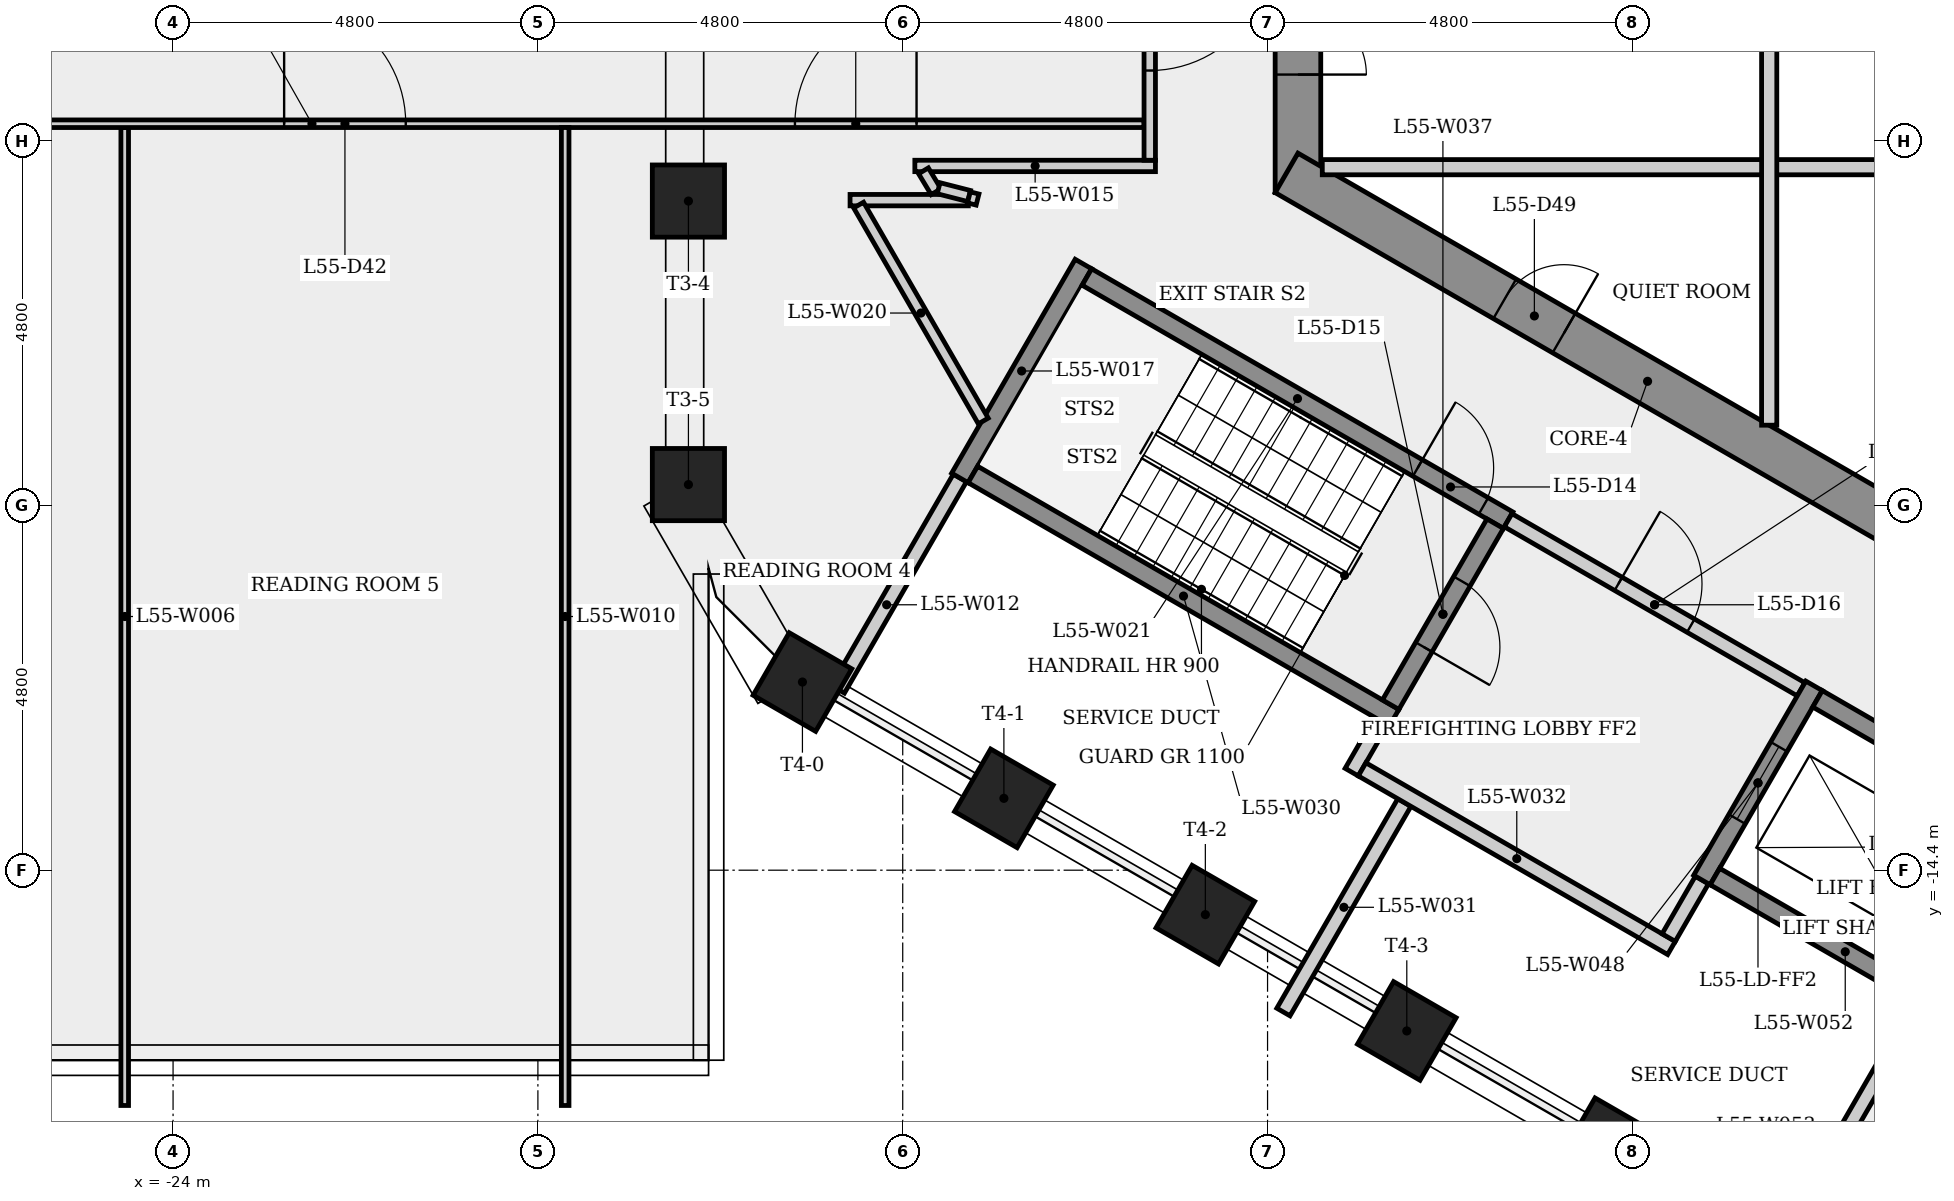
"""IFC4 building model, lengths in metres.
Left out: names, types, materials, properties, quantities, classifications, styles, units other than length and angle.
Written with IfcOpenShell. Run it as: python <this file> out.ifc"""

import sys

from ifc_helpers import new_model, si_unit, direction, frame, frame_2d, origin, origin_2d, place, context, subcontext, project, spatial, rectangle, extrude, element, fill, save


model = new_model("IFC4")
c1 = context("Model", 3, precision=1e-05, world=origin(), true_north=direction((0.0, 1.0)))
c2 = subcontext(c1, "Body", "Model", "MODEL_VIEW")
j1 = project(units=[si_unit("LENGTHUNIT", "METRE"), si_unit("PLANEANGLEUNIT", "RADIAN")], contexts=[c1])
p1 = place(None, origin())
s1 = spatial("IfcSite", under=j1, at=p1, CompositionType="ELEMENT")
p2 = place(p1, origin())
s2 = spatial("IfcBuilding", under=s1, at=p2, CompositionType="ELEMENT")
p3 = place(p2, frame((0.0, 0.0, 206.1)))
s3 = spatial("IfcBuildingStorey", under=s2, at=p3, CompositionType="ELEMENT", Elevation=206.1)
p4 = place(p3, frame((-9.2, 5.485, 0.0), z_axis=(0.0, 0.0, 1.0), x_axis=(0.0, -1.0, 0.0)))
e1 = element("IfcWall", 1, at=p4, inside=s3, PredefinedType="SHEAR", context=c2, shape_type="SweptSolid", body=[
    extrude(rectangle(XDim=10.97, YDim=0.6, at=frame_2d((5.485, 0.0))), origin(), (0.0, 0.0, 1.0), 4.0),
])
p5 = place(p4, frame((8.516, 0.0, 0.0)))
e2 = element("IfcOpeningElement", 2, at=p5, cuts=e1, PredefinedType="OPENING", context=c2, shape_type="SweptSolid", body=[
    extrude(rectangle(XDim=0.9, YDim=2.1, at=frame_2d((0.45, 1.05))), frame((0.0, 0.31, 0.0), z_axis=(0.0, -1.0, 0.0), x_axis=(1.0, 0.0, 0.0)), (0.0, 0.0, 1.0), 0.62),
])
p6 = place(p4, frame((4.685, 0.0, 0.0)))
e3 = element("IfcOpeningElement", 3, at=p6, cuts=e1, PredefinedType="OPENING", context=c2, shape_type="SweptSolid", body=[
    extrude(rectangle(XDim=1.6, YDim=2.1, at=frame_2d((0.8, 1.05))), frame((0.0, 0.31, 0.0), z_axis=(0.0, -1.0, 0.0), x_axis=(1.0, 0.0, 0.0)), (0.0, 0.0, 1.0), 0.62),
])
p7 = place(p3, frame((-9.35, -5.225, 0.0), z_axis=(0.0, 0.0, 1.0), x_axis=(0.866023993627, -0.500002442456, 0.0)))
e4 = element("IfcWall", 4, at=p7, inside=s3, PredefinedType="SHEAR", context=c2, shape_type="SweptSolid", body=[
    extrude(rectangle(XDim=10.97, YDim=0.6, at=frame_2d((5.485, 0.0))), origin(), (0.0, 0.0, 1.0), 4.0),
])
p8 = place(p7, frame((3.315, 0.0, 0.0)))
e5 = element("IfcOpeningElement", 5, at=p8, cuts=e4, PredefinedType="OPENING", context=c2, shape_type="SweptSolid", body=[
    extrude(rectangle(XDim=0.9, YDim=2.1, at=frame_2d((0.45, 1.05))), frame((0.0, 0.31, 0.0), z_axis=(0.0, -1.0, 0.0), x_axis=(1.0, 0.0, 0.0)), (0.0, 0.0, 1.0), 0.62),
])
for number, where, z_axis, x_axis in (
    (6, (-17.219, -5.596, 0.0), (0.0, 0.0, 1.0), (-1.0, 0.0, 0.0)),
    (7, (-17.219, -9.326, 0.0), (0.0, 0.0, 1.0), (-1.0, 0.0, 0.0)),
    (8, (-15.719, -11.924, 0.0), (0.0, 0.0, 1.0), (-0.5, -0.866, 0.0)),
    (9, (-13.069, -13.455, 0.0), (0.0, 0.0, 1.0), (-0.5, -0.866, 0.0)),
    (10, (-10.418, -14.985, 0.0), (0.0, 0.0, 1.0), (-0.5, -0.866, 0.0)),
    (11, (-7.768, -16.515, 0.0), (0.0, 0.0, 1.0), (-0.5, -0.866, 0.0)),
    (12, (-5.117, -18.045, 0.0), (0.0, 0.0, 1.0), (-0.5, -0.866, 0.0)),
):
    element("IfcColumn", number, at=place(p3, frame(where, z_axis=z_axis, x_axis=x_axis)), inside=s3, PredefinedType="COLUMN", context=c2, shape_type="SweptSolid", body=[
        extrude(rectangle(XDim=0.95, YDim=0.95, at=origin_2d()), origin(), (0.0, 0.0, 1.0), 4.0),
    ])
p9 = place(p3, frame((-24.636, -17.496, 0.0), z_axis=(0.0, 0.0, 1.0), x_axis=(0.0, 1.0, 0.0)))
e13 = element("IfcWall", 13, at=p9, inside=s3, PredefinedType="PARTITIONING", context=c2, shape_type="SweptSolid", body=[
    extrude(rectangle(XDim=12.868, YDim=0.1, at=frame_2d((6.434, 0.0))), origin(), (0.0, 0.0, 1.0), 3.6),
])
p10 = place(p3, frame((-33.12, -4.578, 0.0), z_axis=(0.0, 0.0, 1.0), x_axis=(1.0, 0.0, 0.0)))
e14 = element("IfcWall", 14, at=p10, inside=s3, PredefinedType="PARTITIONING", context=c2, shape_type="SweptSolid", body=[
    extrude(rectangle(XDim=21.895, YDim=0.1, at=frame_2d((10.948, 0.0))), origin(), (0.0, 0.0, 1.0), 3.6),
])
p11 = place(p10, frame((17.302, 0.0, 0.0)))
e15 = element("IfcOpeningElement", 15, at=p11, cuts=e14, PredefinedType="OPENING", context=c2, shape_type="SweptSolid", body=[
    extrude(rectangle(XDim=1.6, YDim=2.1, at=frame_2d((0.8, 1.05))), frame((0.0, 0.06, 0.0), z_axis=(0.0, -1.0, 0.0), x_axis=(1.0, 0.0, 0.0)), (0.0, 0.0, 1.0), 0.12),
])
p12 = place(p10, frame((10.582, 0.0, 0.0)))
e16 = element("IfcOpeningElement", 16, at=p12, cuts=e14, PredefinedType="OPENING", context=c2, shape_type="SweptSolid", body=[
    extrude(rectangle(XDim=1.6, YDim=2.1, at=frame_2d((0.8, 1.05))), frame((0.0, 0.06, 0.0), z_axis=(0.0, -1.0, 0.0), x_axis=(1.0, 0.0, 0.0)), (0.0, 0.0, 1.0), 0.12),
])
p13 = place(p10, frame((3.8, 0.0, 0.0)))
e17 = element("IfcOpeningElement", 17, at=p13, cuts=e14, PredefinedType="OPENING", context=c2, shape_type="SweptSolid", body=[
    extrude(rectangle(XDim=1.6, YDim=2.1, at=frame_2d((0.8, 1.05))), frame((0.0, 0.06, 0.0), z_axis=(0.0, -1.0, 0.0), x_axis=(1.0, 0.0, 0.0)), (0.0, 0.0, 1.0), 0.12),
])
p14 = place(p3, frame((-18.841, -17.496, 0.0), z_axis=(0.0, 0.0, 1.0), x_axis=(0.0, 1.0, 0.0)))
e18 = element("IfcWall", 18, at=p14, inside=s3, PredefinedType="PARTITIONING", context=c2, shape_type="SweptSolid", body=[
    extrude(rectangle(XDim=12.868, YDim=0.1, at=frame_2d((6.434, 0.0))), origin(), (0.0, 0.0, 1.0), 3.6),
])
p15 = place(p3, frame((-15.254, -12.02, 0.0), z_axis=(0.0, 0.0, 1.0), x_axis=(0.499957148214, 0.866050142861, 0.0)))
e19 = element("IfcWall", 19, at=p15, inside=s3, PredefinedType="PLUMBINGWALL", context=c2, shape_type="SweptSolid", body=[
    extrude(rectangle(XDim=3.212, YDim=0.2, at=frame_2d((1.606, 0.0))), origin(), (0.0, 0.0, 1.0), 3.6),
])
p16 = place(p3, frame((-15.093, -5.584, 0.0), z_axis=(0.0, 0.0, 1.0), x_axis=(1.0, 0.0, 0.0)))
e20 = element("IfcWall", 20, at=p16, inside=s3, PredefinedType="PARTITIONING", context=c2, shape_type="SweptSolid", body=[
    extrude(rectangle(XDim=1.556, YDim=0.15, at=frame_2d((0.778, 0.0))), origin(), (0.0, 0.0, 1.0), 3.6),
])
p17 = place(p3, frame((-14.24, -5.134, 0.0), z_axis=(0.0, 0.0, 1.0), x_axis=(1.0, 0.0, 0.0)))
e21 = element("IfcWall", 21, at=p17, inside=s3, PredefinedType="PARTITIONING", context=c2, shape_type="SweptSolid", body=[
    extrude(rectangle(XDim=3.166, YDim=0.15, at=frame_2d((1.583, 0.0))), origin(), (0.0, 0.0, 1.0), 3.6),
])
p18 = place(p3, frame((-13.961, -5.472, 0.0), z_axis=(0.0, 0.0, 1.0), x_axis=(-0.51651090313, 0.856280612269, 0.0)))
e22 = element("IfcWall", 22, at=p18, inside=s3, PredefinedType="PARTITIONING", context=c2, shape_type="SweptSolid", body=[
    extrude(rectangle(XDim=0.321, YDim=0.15, at=frame_2d((0.16, 0.0))), origin(), (0.0, 0.0, 1.0), 3.6),
])
p19 = place(p3, frame((-13.648, -9.239, 0.0), z_axis=(0.0, 0.0, 1.0), x_axis=(0.500017246033, 0.866015446554, 0.0)))
e23 = element("IfcWall", 23, at=p19, inside=s3, PredefinedType="SHEAR", context=c2, shape_type="SweptSolid", body=[
    extrude(rectangle(XDim=3.25, YDim=0.25, at=frame_2d((1.625, 0.0))), origin(), (0.0, 0.0, 1.0), 3.6),
])
p20 = place(p3, frame((-13.527, -5.529, 0.0), z_axis=(0.0, 0.0, 1.0), x_axis=(-0.968736704431, 0.248091107232, 0.0)))
e24 = element("IfcWall", 24, at=p20, inside=s3, PredefinedType="PARTITIONING", context=c2, shape_type="SweptSolid", body=[
    extrude(rectangle(XDim=0.413, YDim=0.15, at=frame_2d((0.207, 0.0))), origin(), (0.0, 0.0, 1.0), 3.6),
])
p21 = place(p3, frame((-13.416, -5.576, 0.0), z_axis=(0.0, 0.0, 1.0), x_axis=(-0.968907106081, 0.247424776016, 0.0)))
e25 = element("IfcWall", 25, at=p21, inside=s3, PredefinedType="PARTITIONING", context=c2, shape_type="SweptSolid", body=[
    extrude(rectangle(XDim=0.117, YDim=0.15, at=frame_2d((0.059, 0.0))), origin(), (0.0, 0.0, 1.0), 3.6),
])
p22 = place(p3, frame((-13.34, -8.49, 0.0), z_axis=(0.0, 0.0, 1.0), x_axis=(-0.499997335587, 0.866026942079, 0.0)))
e26 = element("IfcWall", 26, at=p22, inside=s3, PredefinedType="PARTITIONING", context=c2, shape_type="SweptSolid", body=[
    extrude(rectangle(XDim=3.28, YDim=0.15, at=frame_2d((1.64, 0.0))), origin(), (0.0, 0.0, 1.0), 3.6),
])
p23 = place(p3, frame((-11.977, -6.595, 0.0), z_axis=(0.0, 0.0, 1.0), x_axis=(0.866025499775, -0.499999833739, 0.0)))
e27 = element("IfcWall", 27, at=p23, inside=s3, PredefinedType="SHEAR", context=c2, shape_type="SweptSolid", body=[
    extrude(rectangle(XDim=6.4, YDim=0.25, at=frame_2d((3.2, 0.0))), origin(), (0.0, 0.0, 1.0), 3.6),
])
p24 = place(p23, frame((5.025, 0.0, 0.0)))
e28 = element("IfcOpeningElement", 28, at=p24, cuts=e27, PredefinedType="OPENING", context=c2, shape_type="SweptSolid", body=[
    extrude(rectangle(XDim=1.0, YDim=2.1, at=frame_2d((0.5, 1.05))), frame((0.0, 0.135, 0.0), z_axis=(0.0, -1.0, 0.0), x_axis=(1.0, 0.0, 0.0)), (0.0, 0.0, 1.0), 0.27),
])
p25 = place(p3, frame((-11.15, 5.659, 0.0), z_axis=(0.0, 0.0, 1.0), x_axis=(0.0, -1.0, 0.0)))
e29 = element("IfcWall", 29, at=p25, inside=s3, PredefinedType="PARTITIONING", context=c2, shape_type="SweptSolid", body=[
    extrude(rectangle(XDim=10.717, YDim=0.15, at=frame_2d((5.359, 0.0))), origin(), (0.0, 0.0, 1.0), 3.6),
])
p26 = place(p25, frame((7.937, 0.0, 0.0)))
e30 = element("IfcOpeningElement", 30, at=p26, cuts=e29, PredefinedType="OPENING", context=c2, shape_type="SweptSolid", body=[
    extrude(rectangle(XDim=1.6, YDim=2.1, at=frame_2d((0.8, 1.05))), frame((0.0, 0.085, 0.0), z_axis=(0.0, -1.0, 0.0), x_axis=(1.0, 0.0, 0.0)), (0.0, 0.0, 1.0), 0.17),
])
p27 = place(p3, frame((-8.88, -5.15, 0.0), z_axis=(0.0, 0.0, 1.0), x_axis=(1.0, 0.0, 0.0)))
e31 = element("IfcWall", 31, at=p27, inside=s3, PredefinedType="PARTITIONING", context=c2, shape_type="SweptSolid", body=[
    extrude(rectangle(XDim=11.205, YDim=0.2, at=frame_2d((5.603, 0.0))), origin(), (0.0, 0.0, 1.0), 3.6),
])
p28 = place(p3, frame((-8.493, -13.11, 0.0), z_axis=(0.0, 0.0, 1.0), x_axis=(0.500067724834, 0.865986299303, 0.0)))
e32 = element("IfcWall", 32, at=p28, inside=s3, PredefinedType="PLUMBINGWALL", context=c2, shape_type="SweptSolid", body=[
    extrude(rectangle(XDim=0.775, YDim=0.2, at=frame_2d((0.388, 0.0))), origin(), (0.0, 0.0, 1.0), 3.6),
])
p29 = place(p3, frame((-7.935, -12.393, 0.0), z_axis=(0.0, 0.0, 1.0), x_axis=(-0.866025499775, 0.499999833739, 0.0)))
e33 = element("IfcWall", 33, at=p29, inside=s3, PredefinedType="SHEAR", context=c2, shape_type="SweptSolid", body=[
    extrude(rectangle(XDim=6.4, YDim=0.25, at=frame_2d((3.2, 0.0))), origin(), (0.0, 0.0, 1.0), 3.6),
])
p30 = place(p3, frame((-7.8, -13.51, 0.0), z_axis=(0.0, 0.0, 1.0), x_axis=(-0.500016846771, -0.866015677078, 0.0)))
e34 = element("IfcWall", 34, at=p30, inside=s3, PredefinedType="PLUMBINGWALL", context=c2, shape_type="SweptSolid", body=[
    extrude(rectangle(XDim=3.183, YDim=0.2, at=frame_2d((1.591, 0.0))), origin(), (0.0, 0.0, 1.0), 3.6),
])
p31 = place(p3, frame((-8.356, -13.073, 0.0), z_axis=(0.0, 0.0, 1.0), x_axis=(0.866038532462, -0.499977259774, 0.0)))
e35 = element("IfcWall", 35, at=p31, inside=s3, PredefinedType="PLUMBINGWALL", context=c2, shape_type="SweptSolid", body=[
    extrude(rectangle(XDim=4.7, YDim=0.2, at=frame_2d((2.35, 0.0))), origin(), (0.0, 0.0, 1.0), 3.6),
])
p32 = place(p3, frame((-6.605, -9.841, 0.0), z_axis=(0.0, 0.0, 1.0), x_axis=(-0.499996545922, -0.866027397988, 0.0)))
e36 = element("IfcWall", 36, at=p32, inside=s3, PredefinedType="SHEAR", context=c2, shape_type="SweptSolid", body=[
    extrude(rectangle(XDim=2.75, YDim=0.25, at=frame_2d((1.375, 0.0))), origin(), (0.0, 0.0, 1.0), 3.6),
])
p33 = place(p32, frame((0.875, 0.0, 0.0)))
e37 = element("IfcOpeningElement", 37, at=p33, cuts=e36, PredefinedType="OPENING", context=c2, shape_type="SweptSolid", body=[
    extrude(rectangle(XDim=1.0, YDim=2.1, at=frame_2d((0.5, 1.05))), frame((0.0, 0.135, 0.0), z_axis=(0.0, -1.0, 0.0), x_axis=(1.0, 0.0, 0.0)), (0.0, 0.0, 1.0), 0.27),
])
p34 = place(p3, frame((-6.435, -9.795, 0.0), z_axis=(0.0, 0.0, 1.0), x_axis=(0.866012907634, -0.500021643343, 0.0)))
e38 = element("IfcWall", 38, at=p34, inside=s3, PredefinedType="PARTITIONING", context=c2, shape_type="SweptSolid", body=[
    extrude(rectangle(XDim=4.45, YDim=0.2, at=frame_2d((2.225, 0.0))), origin(), (0.0, 0.0, 1.0), 3.6),
])
p35 = place(p34, frame((1.675, 0.0, 0.0)))
e39 = element("IfcOpeningElement", 39, at=p35, cuts=e38, PredefinedType="OPENING", context=c2, shape_type="SweptSolid", body=[
    extrude(rectangle(XDim=1.1, YDim=2.1, at=frame_2d((0.55, 1.05))), frame((0.0, 0.11, 0.0), z_axis=(0.0, -1.0, 0.0), x_axis=(1.0, 0.0, 0.0)), (0.0, 0.0, 1.0), 0.22),
])
p36 = place(p3, frame((-3.885, -14.529, 0.0), z_axis=(0.0, 0.0, 1.0), x_axis=(-0.499859285417, -0.866106630146, 0.0)))
e40 = element("IfcWall", 40, at=p36, inside=s3, PredefinedType="PLUMBINGWALL", context=c2, shape_type="SweptSolid", body=[
    extrude(rectangle(XDim=0.875, YDim=0.2, at=frame_2d((0.438, 0.0))), origin(), (0.0, 0.0, 1.0), 3.6),
])
p37 = place(p3, frame((-3.0, -8.545, 0.0), z_axis=(0.0, 0.0, 1.0), x_axis=(0.0, 1.0, 0.0)))
e41 = element("IfcWall", 41, at=p37, inside=s3, PredefinedType="PARTITIONING", context=c2, shape_type="SweptSolid", body=[
    extrude(rectangle(XDim=6.645, YDim=0.2, at=frame_2d((3.323, 0.0))), origin(), (0.0, 0.0, 1.0), 3.6),
])
p38 = place(p3, frame((-2.41, -11.974, 0.0), z_axis=(0.0, 0.0, 1.0), x_axis=(-0.500001826776, -0.866024349092, 0.0)))
e42 = element("IfcWall", 42, at=p38, inside=s3, PredefinedType="SHEAR", context=c2, shape_type="SweptSolid", body=[
    extrude(rectangle(XDim=2.95, YDim=0.25, at=frame_2d((1.475, 0.0))), origin(), (0.0, 0.0, 1.0), 3.6),
])
p39 = place(p38, frame((0.925, 0.0, 0.0)))
e43 = element("IfcOpeningElement", 43, at=p39, cuts=e42, PredefinedType="OPENING", context=c2, shape_type="SweptSolid", body=[
    extrude(rectangle(XDim=1.1, YDim=2.1, at=frame_2d((0.55, 1.05))), frame((0.0, 0.135, 0.0), z_axis=(0.0, -1.0, 0.0), x_axis=(1.0, 0.0, 0.0)), (0.0, 0.0, 1.0), 0.27),
])
p40 = place(p3, frame((-2.364, -12.145, 0.0), z_axis=(0.0, 0.0, 1.0), x_axis=(0.866040211805, -0.499974350878, 0.0)))
e44 = element("IfcWall", 44, at=p40, inside=s3, PredefinedType="SHEAR", context=c2, shape_type="SweptSolid", body=[
    extrude(rectangle(XDim=3.3, YDim=0.25, at=frame_2d((1.65, 0.0))), origin(), (0.0, 0.0, 1.0), 3.6),
])
p41 = place(p3, frame((-0.856, -16.133, 0.0), z_axis=(0.0, 0.0, 1.0), x_axis=(-0.866021716278, 0.500006386895, 0.0)))
e45 = element("IfcWall", 45, at=p41, inside=s3, PredefinedType="SHEAR", context=c2, shape_type="SweptSolid", body=[
    extrude(rectangle(XDim=3.3, YDim=0.25, at=frame_2d((1.65, 0.0))), origin(), (0.0, 0.0, 1.0), 3.6),
])
p42 = place(p3, frame((-1.027, -16.179, 0.0), z_axis=(0.0, 0.0, 1.0), x_axis=(-0.499989866495, -0.866031254287, 0.0)))
e46 = element("IfcWall", 46, at=p42, inside=s3, PredefinedType="PLUMBINGWALL", context=c2, shape_type="SweptSolid", body=[
    extrude(rectangle(XDim=3.662, YDim=0.2, at=frame_2d((1.831, 0.0))), origin(), (0.0, 0.0, 1.0), 3.6),
])
p43 = place(p24, origin())
e47 = element("IfcDoor", 47, at=p43, inside=s3, OperationType="SINGLE_SWING_LEFT", PredefinedType="DOOR", context=c2, shape_type="SweptSolid", body=[
    extrude(rectangle(XDim=1.0, YDim=2.1, at=frame_2d((0.5, 1.05))), frame((0.0, 0.025, 0.0), z_axis=(0.0, -1.0, 0.0), x_axis=(1.0, 0.0, 0.0)), (0.0, 0.0, 1.0), 0.05),
])
fill(e28, e47)
p44 = place(p33, origin())
e48 = element("IfcDoor", 48, at=p44, inside=s3, OperationType="SINGLE_SWING_RIGHT", PredefinedType="DOOR", context=c2, shape_type="SweptSolid", body=[
    extrude(rectangle(XDim=1.0, YDim=2.1, at=frame_2d((0.5, 1.05))), frame((0.0, 0.025, 0.0), z_axis=(0.0, -1.0, 0.0), x_axis=(1.0, 0.0, 0.0)), (0.0, 0.0, 1.0), 0.05),
])
fill(e37, e48)
p45 = place(p35, origin())
e49 = element("IfcDoor", 49, at=p45, inside=s3, OperationType="SINGLE_SWING_LEFT", PredefinedType="DOOR", context=c2, shape_type="SweptSolid", body=[
    extrude(rectangle(XDim=1.1, YDim=2.1, at=frame_2d((0.55, 1.05))), frame((0.0, 0.025, 0.0), z_axis=(0.0, -1.0, 0.0), x_axis=(1.0, 0.0, 0.0)), (0.0, 0.0, 1.0), 0.05),
])
fill(e39, e49)
p46 = place(p39, origin())
e50 = element("IfcDoor", 50, at=p46, inside=s3, OperationType="SLIDING_TO_LEFT", PredefinedType="DOOR", context=c2, shape_type="SweptSolid", body=[
    extrude(rectangle(XDim=1.1, YDim=2.1, at=frame_2d((0.55, 1.05))), frame((0.0, 0.025, 0.0), z_axis=(0.0, -1.0, 0.0), x_axis=(1.0, 0.0, 0.0)), (0.0, 0.0, 1.0), 0.05),
])
fill(e43, e50)
p47 = place(p26, origin())
e51 = element("IfcDoor", 51, at=p47, inside=s3, OperationType="SINGLE_SWING_LEFT", PredefinedType="DOOR", context=c2, shape_type="SweptSolid", body=[
    extrude(rectangle(XDim=1.6, YDim=2.1, at=frame_2d((0.8, 1.05))), frame((0.0, 0.025, 0.0), z_axis=(0.0, -1.0, 0.0), x_axis=(1.0, 0.0, 0.0)), (0.0, 0.0, 1.0), 0.05),
])
fill(e30, e51)
p48 = place(p11, origin())
e52 = element("IfcDoor", 52, at=p48, inside=s3, OperationType="SINGLE_SWING_RIGHT", PredefinedType="DOOR", context=c2, shape_type="SweptSolid", body=[
    extrude(rectangle(XDim=1.6, YDim=2.1, at=frame_2d((0.8, 1.05))), frame((0.0, 0.025, 0.0), z_axis=(0.0, -1.0, 0.0), x_axis=(1.0, 0.0, 0.0)), (0.0, 0.0, 1.0), 0.05),
])
fill(e15, e52)
p49 = place(p12, origin())
e53 = element("IfcDoor", 53, at=p49, inside=s3, OperationType="SINGLE_SWING_LEFT", PredefinedType="DOOR", context=c2, shape_type="SweptSolid", body=[
    extrude(rectangle(XDim=1.6, YDim=2.1, at=frame_2d((0.8, 1.05))), frame((0.0, 0.025, 0.0), z_axis=(0.0, -1.0, 0.0), x_axis=(1.0, 0.0, 0.0)), (0.0, 0.0, 1.0), 0.05),
])
fill(e16, e53)
p50 = place(p8, origin())
e54 = element("IfcDoor", 54, at=p50, inside=s3, OperationType="SINGLE_SWING_RIGHT", PredefinedType="DOOR", context=c2, shape_type="SweptSolid", body=[
    extrude(rectangle(XDim=0.9, YDim=2.1, at=frame_2d((0.45, 1.05))), frame((0.0, 0.025, 0.0), z_axis=(0.0, -1.0, 0.0), x_axis=(1.0, 0.0, 0.0)), (0.0, 0.0, 1.0), 0.05),
])
fill(e5, e54)
p51 = place(p5, origin())
e55 = element("IfcDoor", 55, at=p51, inside=s3, OperationType="SINGLE_SWING_RIGHT", PredefinedType="DOOR", context=c2, shape_type="SweptSolid", body=[
    extrude(rectangle(XDim=0.9, YDim=2.1, at=frame_2d((0.45, 1.05))), frame((0.0, 0.025, 0.0), z_axis=(0.0, -1.0, 0.0), x_axis=(1.0, 0.0, 0.0)), (0.0, 0.0, 1.0), 0.05),
])
fill(e2, e55)
save(model, sys.argv[1])
